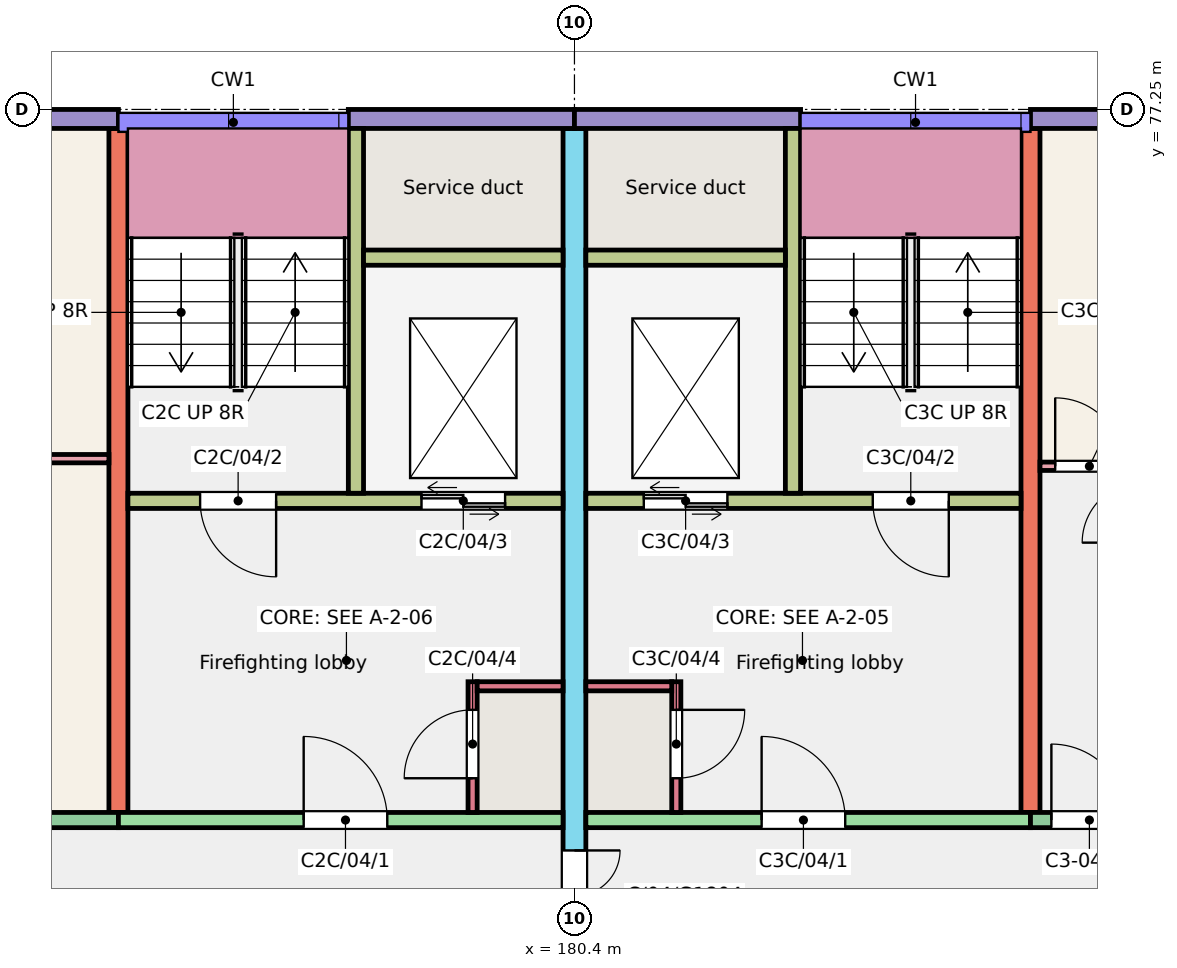
"""IFC4 building model, lengths in metres.
Left out: names, types, materials, properties, quantities, classifications, styles, units other than length and angle.
Written with IfcOpenShell. Run it as: python <this file> out.ifc"""

import sys

from ifc_helpers import new_model, si_unit, direction, frame, frame_2d, origin, place, context, subcontext, project, spatial, rectangle, extrude, element, fill, save


model = new_model("IFC4")
c1 = context("Model", 3, precision=1e-05, world=origin(), true_north=direction((0.0, 1.0)))
c2 = subcontext(c1, "Body", "Model", "MODEL_VIEW")
j1 = project(units=[si_unit("LENGTHUNIT", "METRE"), si_unit("PLANEANGLEUNIT", "RADIAN")], contexts=[c1])
p1 = place(None, origin())
s1 = spatial("IfcSite", under=j1, at=p1, CompositionType="ELEMENT")
p2 = place(p1, origin())
s2 = spatial("IfcBuilding", under=s1, at=p2, CompositionType="ELEMENT")
p3 = place(p2, frame((0.0, 0.0, 12.0)))
s3 = spatial("IfcBuildingStorey", under=s2, at=p3, CompositionType="ELEMENT", Elevation=12.0)
p4 = place(p3, frame((174.4, 68.0, 0.0), z_axis=(0.0, 0.0, 1.0), x_axis=(0.0, 1.0, 0.0)))
e1 = element("IfcWall", 1, at=p4, inside=s3, PredefinedType="SHEAR", context=c2, shape_type="SweptSolid", body=[
    extrude(rectangle(XDim=9.0, YDim=0.25, at=frame_2d((4.5, 0.0))), origin(), (0.0, 0.0, 1.0), 3.0),
])
p5 = place(p3, frame((180.4, 66.0, 0.0), z_axis=(0.0, 0.0, 1.0), x_axis=(0.0, 1.0, 0.0)))
e2 = element("IfcWall", 2, at=p5, inside=s3, PredefinedType="SHEAR", context=c2, shape_type="SweptSolid", body=[
    extrude(rectangle(XDim=11.0, YDim=0.3, at=frame_2d((5.5, 0.0))), origin(), (0.0, 0.0, 1.0), 3.0),
])
p6 = place(p5, frame((0.3, 0.0, 0.0)))
e3 = element("IfcOpeningElement", 3, at=p6, cuts=e2, PredefinedType="OPENING", context=c2, shape_type="SweptSolid", body=[
    extrude(rectangle(XDim=1.2, YDim=2.1, at=frame_2d((0.6, 1.05))), frame((0.0, 0.16, 0.0), z_axis=(0.0, -1.0, 0.0), x_axis=(1.0, 0.0, 0.0)), (0.0, 0.0, 1.0), 0.32),
])
p7 = place(p3, frame((186.4, 68.0, 0.0), z_axis=(0.0, 0.0, 1.0), x_axis=(0.0, 1.0, 0.0)))
e4 = element("IfcWall", 4, at=p7, inside=s3, PredefinedType="SHEAR", context=c2, shape_type="SweptSolid", body=[
    extrude(rectangle(XDim=9.0, YDim=0.25, at=frame_2d((4.5, 0.0))), origin(), (0.0, 0.0, 1.0), 3.0),
])
p8 = place(p3, frame((170.8, 77.125, 0.0), z_axis=(0.0, 0.0, 1.0), x_axis=(1.0, 0.0, 0.0)))
e5 = element("IfcWall", 5, at=p8, inside=s3, PredefinedType="SOLIDWALL", context=c2, shape_type="SweptSolid", body=[
    extrude(rectangle(XDim=3.6, YDim=0.25, at=frame_2d((1.8, 0.0))), origin(), (0.0, 0.0, 1.0), 3.0),
])
p9 = place(p8, frame((1.038, 0.0, 0.9)))
e6 = element("IfcOpeningElement", 6, at=p9, cuts=e5, PredefinedType="OPENING", context=c2, shape_type="SweptSolid", body=[
    extrude(rectangle(XDim=1.5, YDim=1.5, at=frame_2d((0.75, 0.75))), frame((0.0, 0.135, 0.0), z_axis=(0.0, -1.0, 0.0), x_axis=(1.0, 0.0, 0.0)), (0.0, 0.0, 1.0), 0.27),
])
p10 = place(p3, frame((170.8, 67.9, 0.0), z_axis=(0.0, 0.0, 1.0), x_axis=(1.0, 0.0, 0.0)))
e7 = element("IfcWall", 7, at=p10, inside=s3, PredefinedType="SOLIDWALL", context=c2, shape_type="SweptSolid", body=[
    extrude(rectangle(XDim=3.6, YDim=0.2, at=frame_2d((1.8, 0.0))), origin(), (0.0, 0.0, 1.0), 3.0),
])
p11 = place(p10, frame((1.038, 0.0, 0.9)))
e8 = element("IfcOpeningElement", 8, at=p11, cuts=e7, PredefinedType="OPENING", context=c2, shape_type="SweptSolid", body=[
    extrude(rectangle(XDim=1.5, YDim=1.5, at=frame_2d((0.75, 0.75))), frame((0.0, 0.11, 0.0), z_axis=(0.0, -1.0, 0.0), x_axis=(1.0, 0.0, 0.0)), (0.0, 0.0, 1.0), 0.22),
])
p12 = place(p3, frame((177.425, 77.125, 0.0), z_axis=(0.0, 0.0, 1.0), x_axis=(1.0, 0.0, 0.0)))
e9 = element("IfcWall", 9, at=p12, inside=s3, PredefinedType="SOLIDWALL", context=c2, shape_type="SweptSolid", body=[
    extrude(rectangle(XDim=2.975, YDim=0.25, at=frame_2d((1.487, 0.0))), origin(), (0.0, 0.0, 1.0), 3.0),
])
p13 = place(p3, frame((174.4, 67.9, 0.0), z_axis=(0.0, 0.0, 1.0), x_axis=(1.0, 0.0, 0.0)))
e10 = element("IfcWall", 10, at=p13, inside=s3, PredefinedType="SHEAR", context=c2, shape_type="SweptSolid", body=[
    extrude(rectangle(XDim=5.85, YDim=0.2, at=frame_2d((2.925, 0.0))), origin(), (0.0, 0.0, 1.0), 3.0),
])
p14 = place(p13, frame((2.438, 0.0, 0.0)))
e11 = element("IfcOpeningElement", 11, at=p14, cuts=e10, PredefinedType="OPENING", context=c2, shape_type="SweptSolid", body=[
    extrude(rectangle(XDim=1.1, YDim=2.1, at=frame_2d((0.55, 1.05))), frame((0.0, 0.11, 0.0), z_axis=(0.0, -1.0, 0.0), x_axis=(1.0, 0.0, 0.0)), (0.0, 0.0, 1.0), 0.22),
])
p15 = place(p3, frame((174.525, 72.1, 0.0), z_axis=(0.0, 0.0, 1.0), x_axis=(1.0, 0.0, 0.0)))
e12 = element("IfcWall", 12, at=p15, inside=s3, PredefinedType="SHEAR", context=c2, shape_type="SweptSolid", body=[
    extrude(rectangle(XDim=5.725, YDim=0.2, at=frame_2d((2.863, 0.0))), origin(), (0.0, 0.0, 1.0), 3.0),
])
p16 = place(p15, frame((0.95, 0.0, 0.0)))
e13 = element("IfcOpeningElement", 13, at=p16, cuts=e12, PredefinedType="OPENING", context=c2, shape_type="SweptSolid", body=[
    extrude(rectangle(XDim=1.0, YDim=2.1, at=frame_2d((0.5, 1.05))), frame((0.0, 0.11, 0.0), z_axis=(0.0, -1.0, 0.0), x_axis=(1.0, 0.0, 0.0)), (0.0, 0.0, 1.0), 0.22),
])
p17 = place(p15, frame((3.863, 0.0, 0.0)))
e14 = element("IfcOpeningElement", 14, at=p17, cuts=e12, PredefinedType="OPENING", context=c2, shape_type="SweptSolid", body=[
    extrude(rectangle(XDim=1.1, YDim=2.1, at=frame_2d((0.55, 1.05))), frame((0.0, 0.11, 0.0), z_axis=(0.0, -1.0, 0.0), x_axis=(1.0, 0.0, 0.0)), (0.0, 0.0, 1.0), 0.22),
])
p18 = place(p3, frame((177.525, 72.2, 0.0), z_axis=(0.0, 0.0, 1.0), x_axis=(0.0, 1.0, 0.0)))
e15 = element("IfcWall", 15, at=p18, inside=s3, PredefinedType="SHEAR", context=c2, shape_type="SweptSolid", body=[
    extrude(rectangle(XDim=4.8, YDim=0.2, at=frame_2d((2.4, 0.0))), origin(), (0.0, 0.0, 1.0), 3.0),
])
p19 = place(p3, frame((177.625, 75.3, 0.0), z_axis=(0.0, 0.0, 1.0), x_axis=(1.0, 0.0, 0.0)))
e16 = element("IfcWall", 16, at=p19, inside=s3, PredefinedType="SHEAR", context=c2, shape_type="SweptSolid", body=[
    extrude(rectangle(XDim=2.625, YDim=0.2, at=frame_2d((1.312, 0.0))), origin(), (0.0, 0.0, 1.0), 3.0),
])
p20 = place(p3, frame((179.06, 68.0, 0.0), z_axis=(0.0, 0.0, 1.0), x_axis=(0.0, 1.0, 0.0)))
e17 = element("IfcWall", 17, at=p20, inside=s3, PredefinedType="SHEAR", context=c2, shape_type="SweptSolid", body=[
    extrude(rectangle(XDim=1.72, YDim=0.12, at=frame_2d((0.86, 0.0))), origin(), (0.0, 0.0, 1.0), 3.0),
])
p21 = place(p20, frame((0.45, 0.0, 0.0)))
e18 = element("IfcOpeningElement", 18, at=p21, cuts=e17, PredefinedType="OPENING", context=c2, shape_type="SweptSolid", body=[
    extrude(rectangle(XDim=0.9, YDim=2.1, at=frame_2d((0.45, 1.05))), frame((0.0, 0.07, 0.0), z_axis=(0.0, -1.0, 0.0), x_axis=(1.0, 0.0, 0.0)), (0.0, 0.0, 1.0), 0.14),
])
p22 = place(p3, frame((179.12, 69.66, 0.0), z_axis=(0.0, 0.0, 1.0), x_axis=(1.0, 0.0, 0.0)))
e19 = element("IfcWall", 19, at=p22, inside=s3, PredefinedType="SHEAR", context=c2, shape_type="SweptSolid", body=[
    extrude(rectangle(XDim=1.13, YDim=0.12, at=frame_2d((0.565, 0.0))), origin(), (0.0, 0.0, 1.0), 3.0),
])
p23 = place(p3, frame((180.4, 77.125, 0.0), z_axis=(0.0, 0.0, 1.0), x_axis=(1.0, 0.0, 0.0)))
e20 = element("IfcWall", 20, at=p23, inside=s3, PredefinedType="SOLIDWALL", context=c2, shape_type="SweptSolid", body=[
    extrude(rectangle(XDim=2.975, YDim=0.25, at=frame_2d((1.488, 0.0))), origin(), (0.0, 0.0, 1.0), 3.0),
])
p24 = place(p3, frame((180.55, 67.9, 0.0), z_axis=(0.0, 0.0, 1.0), x_axis=(1.0, 0.0, 0.0)))
e21 = element("IfcWall", 21, at=p24, inside=s3, PredefinedType="SHEAR", context=c2, shape_type="SweptSolid", body=[
    extrude(rectangle(XDim=5.85, YDim=0.2, at=frame_2d((2.925, 0.0))), origin(), (0.0, 0.0, 1.0), 3.0),
])
p25 = place(p24, frame((2.312, 0.0, 0.0)))
e22 = element("IfcOpeningElement", 22, at=p25, cuts=e21, PredefinedType="OPENING", context=c2, shape_type="SweptSolid", body=[
    extrude(rectangle(XDim=1.1, YDim=2.1, at=frame_2d((0.55, 1.05))), frame((0.0, 0.11, 0.0), z_axis=(0.0, -1.0, 0.0), x_axis=(1.0, 0.0, 0.0)), (0.0, 0.0, 1.0), 0.22),
])
p26 = place(p3, frame((180.55, 72.1, 0.0), z_axis=(0.0, 0.0, 1.0), x_axis=(1.0, 0.0, 0.0)))
e23 = element("IfcWall", 23, at=p26, inside=s3, PredefinedType="SHEAR", context=c2, shape_type="SweptSolid", body=[
    extrude(rectangle(XDim=5.725, YDim=0.2, at=frame_2d((2.862, 0.0))), origin(), (0.0, 0.0, 1.0), 3.0),
])
p27 = place(p26, frame((3.775, 0.0, 0.0)))
e24 = element("IfcOpeningElement", 24, at=p27, cuts=e23, PredefinedType="OPENING", context=c2, shape_type="SweptSolid", body=[
    extrude(rectangle(XDim=1.0, YDim=2.1, at=frame_2d((0.5, 1.05))), frame((0.0, 0.11, 0.0), z_axis=(0.0, -1.0, 0.0), x_axis=(1.0, 0.0, 0.0)), (0.0, 0.0, 1.0), 0.22),
])
p28 = place(p26, frame((0.762, 0.0, 0.0)))
e25 = element("IfcOpeningElement", 25, at=p28, cuts=e23, PredefinedType="OPENING", context=c2, shape_type="SweptSolid", body=[
    extrude(rectangle(XDim=1.1, YDim=2.1, at=frame_2d((0.55, 1.05))), frame((0.0, 0.11, 0.0), z_axis=(0.0, -1.0, 0.0), x_axis=(1.0, 0.0, 0.0)), (0.0, 0.0, 1.0), 0.22),
])
p29 = place(p3, frame((183.275, 72.2, 0.0), z_axis=(0.0, 0.0, 1.0), x_axis=(0.0, 1.0, 0.0)))
e26 = element("IfcWall", 26, at=p29, inside=s3, PredefinedType="SHEAR", context=c2, shape_type="SweptSolid", body=[
    extrude(rectangle(XDim=4.8, YDim=0.2, at=frame_2d((2.4, 0.0))), origin(), (0.0, 0.0, 1.0), 3.0),
])
p30 = place(p3, frame((180.55, 75.3, 0.0), z_axis=(0.0, 0.0, 1.0), x_axis=(1.0, 0.0, 0.0)))
e27 = element("IfcWall", 27, at=p30, inside=s3, PredefinedType="SHEAR", context=c2, shape_type="SweptSolid", body=[
    extrude(rectangle(XDim=2.625, YDim=0.2, at=frame_2d((1.312, 0.0))), origin(), (0.0, 0.0, 1.0), 3.0),
])
p31 = place(p3, frame((181.74, 68.0, 0.0), z_axis=(0.0, 0.0, 1.0), x_axis=(0.0, 1.0, 0.0)))
e28 = element("IfcWall", 28, at=p31, inside=s3, PredefinedType="SHEAR", context=c2, shape_type="SweptSolid", body=[
    extrude(rectangle(XDim=1.72, YDim=0.12, at=frame_2d((0.86, 0.0))), origin(), (0.0, 0.0, 1.0), 3.0),
])
p32 = place(p31, frame((0.45, 0.0, 0.0)))
e29 = element("IfcOpeningElement", 29, at=p32, cuts=e28, PredefinedType="OPENING", context=c2, shape_type="SweptSolid", body=[
    extrude(rectangle(XDim=0.9, YDim=2.1, at=frame_2d((0.45, 1.05))), frame((0.0, 0.07, 0.0), z_axis=(0.0, -1.0, 0.0), x_axis=(1.0, 0.0, 0.0)), (0.0, 0.0, 1.0), 0.14),
])
p33 = place(p3, frame((180.55, 69.66, 0.0), z_axis=(0.0, 0.0, 1.0), x_axis=(1.0, 0.0, 0.0)))
e30 = element("IfcWall", 30, at=p33, inside=s3, PredefinedType="SHEAR", context=c2, shape_type="SweptSolid", body=[
    extrude(rectangle(XDim=1.13, YDim=0.12, at=frame_2d((0.565, 0.0))), origin(), (0.0, 0.0, 1.0), 3.0),
])
p34 = place(p3, frame((186.4, 77.125, 0.0), z_axis=(0.0, 0.0, 1.0), x_axis=(1.0, 0.0, 0.0)))
e31 = element("IfcWall", 31, at=p34, inside=s3, PredefinedType="SOLIDWALL", context=c2, shape_type="SweptSolid", body=[
    extrude(rectangle(XDim=3.6, YDim=0.25, at=frame_2d((1.8, 0.0))), origin(), (0.0, 0.0, 1.0), 3.0),
])
p35 = place(p34, frame((1.062, 0.0, 0.9)))
e32 = element("IfcOpeningElement", 32, at=p35, cuts=e31, PredefinedType="OPENING", context=c2, shape_type="SweptSolid", body=[
    extrude(rectangle(XDim=1.5, YDim=1.5, at=frame_2d((0.75, 0.75))), frame((0.0, 0.135, 0.0), z_axis=(0.0, -1.0, 0.0), x_axis=(1.0, 0.0, 0.0)), (0.0, 0.0, 1.0), 0.27),
])
p36 = place(p3, frame((186.4, 67.9, 0.0), z_axis=(0.0, 0.0, 1.0), x_axis=(1.0, 0.0, 0.0)))
e33 = element("IfcWall", 33, at=p36, inside=s3, PredefinedType="SOLIDWALL", context=c2, shape_type="SweptSolid", body=[
    extrude(rectangle(XDim=3.6, YDim=0.2, at=frame_2d((1.8, 0.0))), origin(), (0.0, 0.0, 1.0), 3.0),
])
p37 = place(p36, frame((1.917, 0.0, 1.1)))
e34 = element("IfcOpeningElement", 34, at=p37, cuts=e33, PredefinedType="OPENING", context=c2, shape_type="SweptSolid", body=[
    extrude(rectangle(XDim=1.2, YDim=1.3, at=frame_2d((0.6, 0.65))), frame((0.0, 0.11, 0.0), z_axis=(0.0, -1.0, 0.0), x_axis=(1.0, 0.0, 0.0)), (0.0, 0.0, 1.0), 0.22),
])
p38 = place(p36, frame((0.275, 0.0, 0.0)))
e35 = element("IfcOpeningElement", 35, at=p38, cuts=e33, PredefinedType="OPENING", context=c2, shape_type="SweptSolid", body=[
    extrude(rectangle(XDim=1.0, YDim=2.1, at=frame_2d((0.5, 1.05))), frame((0.0, 0.11, 0.0), z_axis=(0.0, -1.0, 0.0), x_axis=(1.0, 0.0, 0.0)), (0.0, 0.0, 1.0), 0.22),
])
p39 = place(p3, frame((170.9, 72.655, 0.0), z_axis=(0.0, 0.0, 1.0), x_axis=(1.0, 0.0, 0.0)))
e36 = element("IfcWall", 36, at=p39, inside=s3, PredefinedType="PARTITIONING", context=c2, shape_type="SweptSolid", body=[
    extrude(rectangle(XDim=3.375, YDim=0.11, at=frame_2d((1.688, 0.0))), origin(), (0.0, 0.0, 1.0), 2.8),
])
p40 = place(p3, frame((186.525, 72.555, 0.0), z_axis=(0.0, 0.0, 1.0), x_axis=(1.0, 0.0, 0.0)))
e37 = element("IfcWall", 37, at=p40, inside=s3, PredefinedType="PARTITIONING", context=c2, shape_type="SweptSolid", body=[
    extrude(rectangle(XDim=3.375, YDim=0.11, at=frame_2d((1.688, 0.0))), origin(), (0.0, 0.0, 1.0), 2.8),
])
p41 = place(p40, frame((0.2, 0.0, 0.0)))
e38 = element("IfcOpeningElement", 38, at=p41, cuts=e37, PredefinedType="OPENING", context=c2, shape_type="SweptSolid", body=[
    extrude(rectangle(XDim=0.9, YDim=2.1, at=frame_2d((0.45, 1.05))), frame((0.0, 0.065, 0.0), z_axis=(0.0, -1.0, 0.0), x_axis=(1.0, 0.0, 0.0)), (0.0, 0.0, 1.0), 0.13),
])
p42 = place(p38, origin())
e39 = element("IfcDoor", 39, at=p42, inside=s3, OperationType="SINGLE_SWING_LEFT", PredefinedType="DOOR", context=c2, shape_type="SweptSolid", body=[
    extrude(rectangle(XDim=1.0, YDim=2.1, at=frame_2d((0.5, 1.05))), frame((0.0, 0.025, 0.0), z_axis=(0.0, -1.0, 0.0), x_axis=(1.0, 0.0, 0.0)), (0.0, 0.0, 1.0), 0.05),
])
fill(e35, e39)
p43 = place(p41, origin())
e40 = element("IfcDoor", 40, at=p43, inside=s3, OperationType="SINGLE_SWING_LEFT", PredefinedType="DOOR", context=c2, shape_type="SweptSolid", body=[
    extrude(rectangle(XDim=0.9, YDim=2.1, at=frame_2d((0.45, 1.05))), frame((0.0, 0.025, 0.0), z_axis=(0.0, -1.0, 0.0), x_axis=(1.0, 0.0, 0.0)), (0.0, 0.0, 1.0), 0.05),
])
fill(e38, e40)
p44 = place(p14, origin())
e41 = element("IfcDoor", 41, at=p44, inside=s3, OperationType="SINGLE_SWING_LEFT", PredefinedType="DOOR", context=c2, shape_type="SweptSolid", body=[
    extrude(rectangle(XDim=1.1, YDim=2.1, at=frame_2d((0.55, 1.05))), frame((0.0, 0.025, 0.0), z_axis=(0.0, -1.0, 0.0), x_axis=(1.0, 0.0, 0.0)), (0.0, 0.0, 1.0), 0.05),
])
fill(e11, e41)
p45 = place(p16, origin())
e42 = element("IfcDoor", 42, at=p45, inside=s3, OperationType="SINGLE_SWING_RIGHT", PredefinedType="DOOR", context=c2, shape_type="SweptSolid", body=[
    extrude(rectangle(XDim=1.0, YDim=2.1, at=frame_2d((0.5, 1.05))), frame((0.0, 0.025, 0.0), z_axis=(0.0, -1.0, 0.0), x_axis=(1.0, 0.0, 0.0)), (0.0, 0.0, 1.0), 0.05),
])
fill(e13, e42)
p46 = place(p17, origin())
e43 = element("IfcDoor", 43, at=p46, inside=s3, OperationType="DOUBLE_DOOR_SLIDING", PredefinedType="DOOR", context=c2, shape_type="SweptSolid", body=[
    extrude(rectangle(XDim=1.1, YDim=2.1, at=frame_2d((0.55, 1.05))), frame((0.0, 0.025, 0.0), z_axis=(0.0, -1.0, 0.0), x_axis=(1.0, 0.0, 0.0)), (0.0, 0.0, 1.0), 0.05),
])
fill(e14, e43)
p47 = place(p21, origin())
e44 = element("IfcDoor", 44, at=p47, inside=s3, OperationType="SINGLE_SWING_LEFT", PredefinedType="DOOR", context=c2, shape_type="SweptSolid", body=[
    extrude(rectangle(XDim=0.9, YDim=2.1, at=frame_2d((0.45, 1.05))), frame((0.0, 0.025, 0.0), z_axis=(0.0, -1.0, 0.0), x_axis=(1.0, 0.0, 0.0)), (0.0, 0.0, 1.0), 0.05),
])
fill(e18, e44)
p48 = place(p25, origin())
e45 = element("IfcDoor", 45, at=p48, inside=s3, OperationType="SINGLE_SWING_LEFT", PredefinedType="DOOR", context=c2, shape_type="SweptSolid", body=[
    extrude(rectangle(XDim=1.1, YDim=2.1, at=frame_2d((0.55, 1.05))), frame((0.0, 0.025, 0.0), z_axis=(0.0, -1.0, 0.0), x_axis=(1.0, 0.0, 0.0)), (0.0, 0.0, 1.0), 0.05),
])
fill(e22, e45)
p49 = place(p27, origin())
e46 = element("IfcDoor", 46, at=p49, inside=s3, OperationType="SINGLE_SWING_RIGHT", PredefinedType="DOOR", context=c2, shape_type="SweptSolid", body=[
    extrude(rectangle(XDim=1.0, YDim=2.1, at=frame_2d((0.5, 1.05))), frame((0.0, 0.025, 0.0), z_axis=(0.0, -1.0, 0.0), x_axis=(1.0, 0.0, 0.0)), (0.0, 0.0, 1.0), 0.05),
])
fill(e24, e46)
p50 = place(p28, origin())
e47 = element("IfcDoor", 47, at=p50, inside=s3, OperationType="DOUBLE_DOOR_SLIDING", PredefinedType="DOOR", context=c2, shape_type="SweptSolid", body=[
    extrude(rectangle(XDim=1.1, YDim=2.1, at=frame_2d((0.55, 1.05))), frame((0.0, 0.025, 0.0), z_axis=(0.0, -1.0, 0.0), x_axis=(1.0, 0.0, 0.0)), (0.0, 0.0, 1.0), 0.05),
])
fill(e25, e47)
p51 = place(p32, origin())
e48 = element("IfcDoor", 48, at=p51, inside=s3, OperationType="SINGLE_SWING_RIGHT", PredefinedType="DOOR", context=c2, shape_type="SweptSolid", body=[
    extrude(rectangle(XDim=0.9, YDim=2.1, at=frame_2d((0.45, 1.05))), frame((0.0, 0.025, 0.0), z_axis=(0.0, -1.0, 0.0), x_axis=(1.0, 0.0, 0.0)), (0.0, 0.0, 1.0), 0.05),
])
fill(e29, e48)
p52 = place(p6, origin())
e49 = element("IfcDoor", 49, at=p52, inside=s3, OperationType="DOUBLE_DOOR_SINGLE_SWING", PredefinedType="DOOR", context=c2, shape_type="SweptSolid", body=[
    extrude(rectangle(XDim=1.2, YDim=2.1, at=frame_2d((0.6, 1.05))), frame((0.0, 0.025, 0.0), z_axis=(0.0, -1.0, 0.0), x_axis=(1.0, 0.0, 0.0)), (0.0, 0.0, 1.0), 0.05),
])
fill(e3, e49)
save(model, sys.argv[1])
